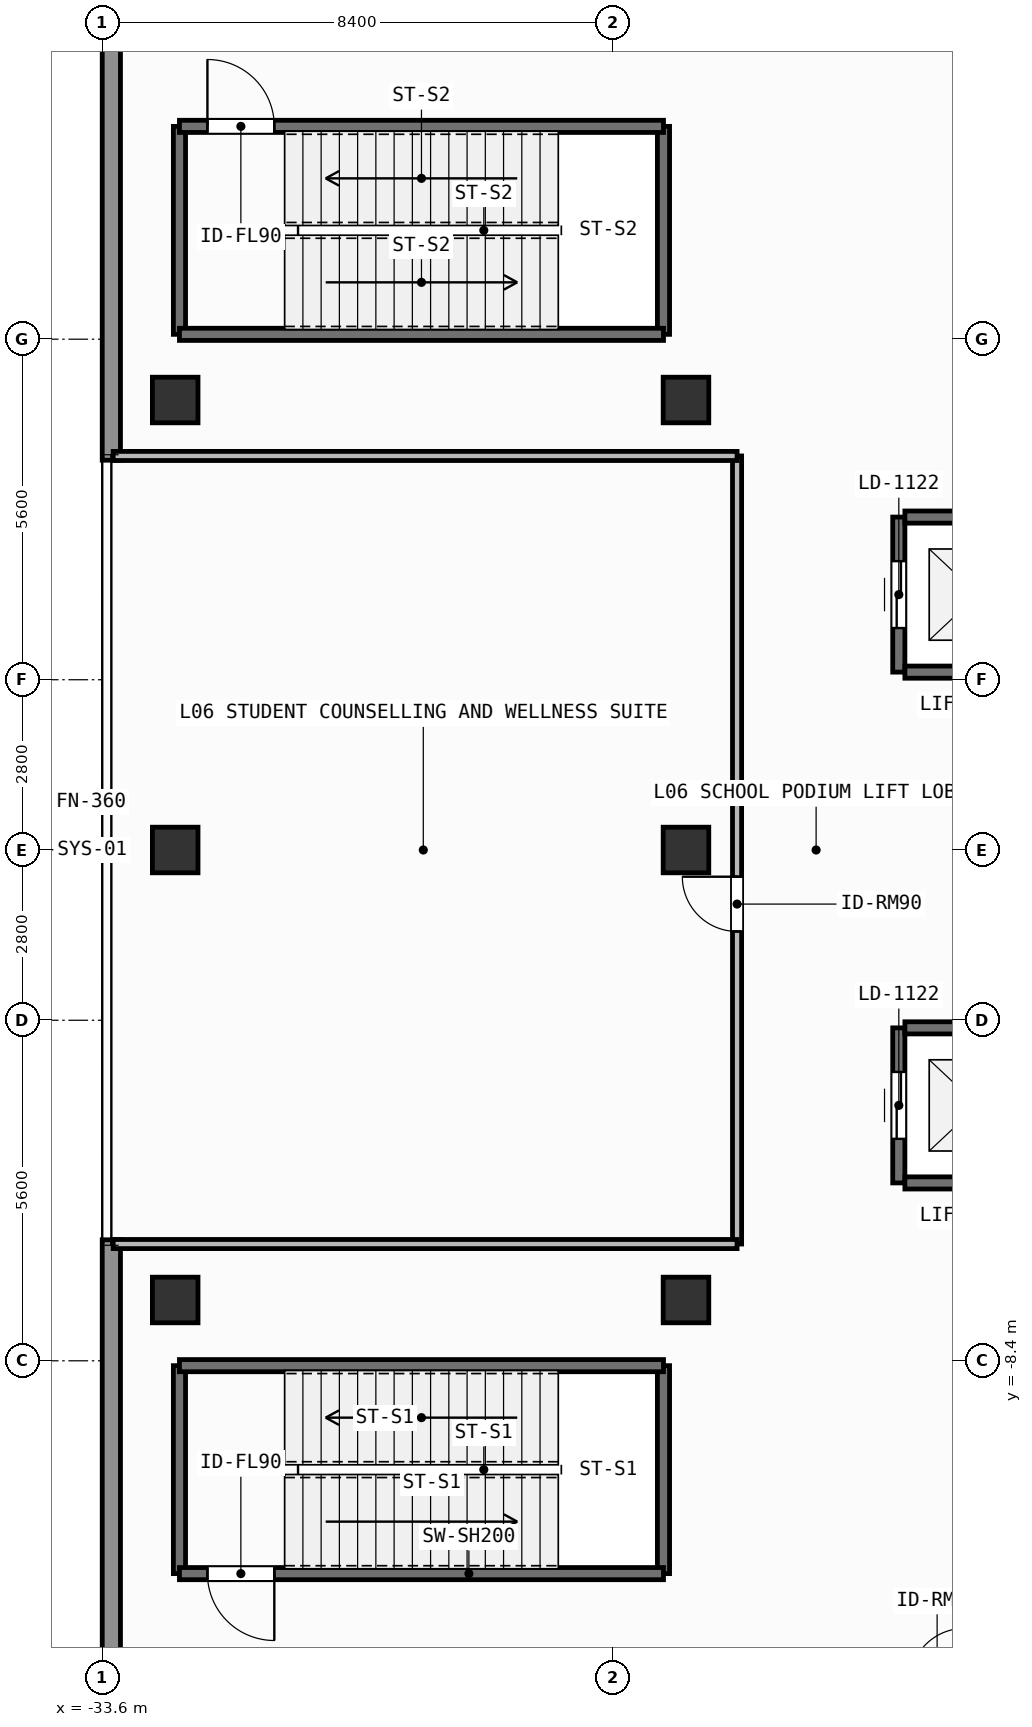
"""IFC4 building model, lengths in metres.
Left out: names, types, materials, properties, quantities, classifications, styles, units other than length and angle.
Written with IfcOpenShell. Run it as: python <this file> out.ifc"""

import sys

from ifc_helpers import new_model, si_unit, direction, frame, frame_2d, origin, origin_2d, place, context, subcontext, project, spatial, rectangle, extrude, element, fill, save


model = new_model("IFC4")
c1 = context("Model", 3, precision=1e-05, world=origin(), true_north=direction((0.0, 1.0)))
c2 = subcontext(c1, "Body", "Model", "MODEL_VIEW")
j1 = project(units=[si_unit("LENGTHUNIT", "METRE"), si_unit("PLANEANGLEUNIT", "RADIAN")], contexts=[c1])
p1 = place(None, origin())
s1 = spatial("IfcSite", under=j1, at=p1, CompositionType="ELEMENT")
p2 = place(p1, origin())
s2 = spatial("IfcBuilding", under=s1, at=p2, CompositionType="ELEMENT")
p3 = place(p2, frame((0.0, 0.0, 21.6)))
s3 = spatial("IfcBuildingStorey", under=s2, at=p3, CompositionType="ELEMENT", Elevation=21.6)
for number, where, z_axis, x_axis in (
    (1, (-32.4, -7.4, 0.0), (0.0, 0.0, 1.0), (1.0, 0.0, 0.0)),
    (2, (-32.4, 0.0, 0.0), (0.0, 0.0, 1.0), (1.0, 0.0, 0.0)),
    (3, (-32.4, 7.4, 0.0), (0.0, 0.0, 1.0), (1.0, 0.0, 0.0)),
    (4, (-24.0, -7.4, 0.0), (0.0, 0.0, 1.0), (1.0, 0.0, 0.0)),
    (5, (-24.0, 0.0, 0.0), (0.0, 0.0, 1.0), (1.0, 0.0, 0.0)),
    (6, (-24.0, 7.4, 0.0), (0.0, 0.0, 1.0), (1.0, 0.0, 0.0)),
):
    element("IfcColumn", number, at=place(p3, frame(where, z_axis=z_axis, x_axis=x_axis)), inside=s3, PredefinedType="COLUMN", context=c2, shape_type="SweptSolid", body=[
        extrude(rectangle(XDim=0.75, YDim=0.75, at=origin_2d()), origin(), (0.0, 0.0, 1.0), 4.8),
    ])
for number, where, z_axis, x_axis in (
    (7, (-33.45, -20.5, 0.0), (0.0, 0.0, 1.0), (0.0, 1.0, 0.0)),
    (8, (-33.45, 6.41, 0.0), (0.0, 0.0, 1.0), (0.0, 1.0, 0.0)),
):
    element("IfcWall", number, at=place(p3, frame(where, z_axis=z_axis, x_axis=x_axis)), inside=s3, PredefinedType="SOLIDWALL", context=c2, shape_type="SweptSolid", body=[
        extrude(rectangle(XDim=14.09, YDim=0.3, at=frame_2d((7.045, 0.0))), origin(), (0.0, 0.0, 1.0), 4.48),
    ])
p4 = place(p3, frame((-20.5, -5.475, 0.0), z_axis=(0.0, 0.0, 1.0), x_axis=(0.0, 1.0, 0.0)))
e9 = element("IfcWall", 9, at=p4, inside=s3, PredefinedType="SHEAR", context=c2, shape_type="SweptSolid", body=[
    extrude(rectangle(XDim=2.55, YDim=0.2, at=frame_2d((1.275, 0.0))), origin(), (0.0, 0.0, 1.0), 4.48),
])
p5 = place(p4, frame((0.725, 0.0, 0.0)))
e10 = element("IfcOpeningElement", 10, at=p5, cuts=e9, PredefinedType="OPENING", context=c2, shape_type="SweptSolid", body=[
    extrude(rectangle(XDim=1.1, YDim=2.2, at=frame_2d((0.55, 1.1))), frame((0.0, 0.11, 0.0), z_axis=(0.0, -1.0, 0.0), x_axis=(1.0, 0.0, 0.0)), (0.0, 0.0, 1.0), 0.22),
])
for number, where, z_axis, x_axis in (
    (11, (-20.4, -5.475, 0.0), (0.0, 0.0, 1.0), (1.0, 0.0, 0.0)),
    (12, (-20.4, -2.925, 0.0), (0.0, 0.0, 1.0), (1.0, 0.0, 0.0)),
):
    element("IfcWall", number, at=place(p3, frame(where, z_axis=z_axis, x_axis=x_axis)), inside=s3, PredefinedType="SHEAR", context=c2, shape_type="SweptSolid", body=[
        extrude(rectangle(XDim=2.4, YDim=0.2, at=frame_2d((1.2, 0.0))), origin(), (0.0, 0.0, 1.0), 4.48),
    ])
p6 = place(p3, frame((-20.5, 2.925, 0.0), z_axis=(0.0, 0.0, 1.0), x_axis=(0.0, 1.0, 0.0)))
e13 = element("IfcWall", 13, at=p6, inside=s3, PredefinedType="SHEAR", context=c2, shape_type="SweptSolid", body=[
    extrude(rectangle(XDim=2.55, YDim=0.2, at=frame_2d((1.275, 0.0))), origin(), (0.0, 0.0, 1.0), 4.48),
])
p7 = place(p6, frame((0.725, 0.0, 0.0)))
e14 = element("IfcOpeningElement", 14, at=p7, cuts=e13, PredefinedType="OPENING", context=c2, shape_type="SweptSolid", body=[
    extrude(rectangle(XDim=1.1, YDim=2.2, at=frame_2d((0.55, 1.1))), frame((0.0, 0.11, 0.0), z_axis=(0.0, -1.0, 0.0), x_axis=(1.0, 0.0, 0.0)), (0.0, 0.0, 1.0), 0.22),
])
for number, where, z_axis, x_axis in (
    (15, (-20.4, 2.925, 0.0), (0.0, 0.0, 1.0), (1.0, 0.0, 0.0)),
    (16, (-20.4, 5.475, 0.0), (0.0, 0.0, 1.0), (1.0, 0.0, 0.0)),
):
    element("IfcWall", number, at=place(p3, frame(where, z_axis=z_axis, x_axis=x_axis)), inside=s3, PredefinedType="SHEAR", context=c2, shape_type="SweptSolid", body=[
        extrude(rectangle(XDim=2.4, YDim=0.2, at=frame_2d((1.2, 0.0))), origin(), (0.0, 0.0, 1.0), 4.48),
    ])
for number, where, z_axis, x_axis in (
    (17, (-32.33, -11.9, 0.0), (0.0, 0.0, 1.0), (0.0, 1.0, 0.0)),
    (18, (-24.37, -8.48, 0.0), (0.0, 0.0, 1.0), (0.0, -1.0, 0.0)),
):
    element("IfcWall", number, at=place(p3, frame(where, z_axis=z_axis, x_axis=x_axis)), inside=s3, PredefinedType="SHEAR", context=c2, shape_type="SweptSolid", body=[
        extrude(rectangle(XDim=3.42, YDim=0.2, at=frame_2d((1.71, 0.0))), origin(), (0.0, 0.0, 1.0), 4.48),
    ])
p8 = place(p3, frame((-24.37, -11.9, 0.0), z_axis=(0.0, 0.0, 1.0), x_axis=(-1.0, 0.0, 0.0)))
e19 = element("IfcWall", 19, at=p8, inside=s3, PredefinedType="SHEAR", context=c2, shape_type="SweptSolid", body=[
    extrude(rectangle(XDim=7.96, YDim=0.2, at=frame_2d((3.98, 0.0))), origin(), (0.0, 0.0, 1.0), 4.48),
])
p9 = place(p8, frame((6.4, 0.0, 0.0)))
e20 = element("IfcOpeningElement", 20, at=p9, cuts=e19, PredefinedType="OPENING", context=c2, shape_type="SweptSolid", body=[
    extrude(rectangle(XDim=1.1, YDim=2.15, at=frame_2d((0.55, 1.075))), frame((0.0, 0.11, 0.0), z_axis=(0.0, -1.0, 0.0), x_axis=(1.0, 0.0, 0.0)), (0.0, 0.0, 1.0), 0.22),
])
p10 = place(p3, frame((-32.33, -8.48, 0.0), z_axis=(0.0, 0.0, 1.0), x_axis=(1.0, 0.0, 0.0)))
e21 = element("IfcWall", 21, at=p10, inside=s3, PredefinedType="SHEAR", context=c2, shape_type="SweptSolid", body=[
    extrude(rectangle(XDim=7.96, YDim=0.2, at=frame_2d((3.98, 0.0))), origin(), (0.0, 0.0, 1.0), 4.48),
])
for number, where, z_axis, x_axis in (
    (22, (-32.33, 8.48, 0.0), (0.0, 0.0, 1.0), (0.0, 1.0, 0.0)),
    (23, (-24.37, 11.9, 0.0), (0.0, 0.0, 1.0), (0.0, -1.0, 0.0)),
):
    element("IfcWall", number, at=place(p3, frame(where, z_axis=z_axis, x_axis=x_axis)), inside=s3, PredefinedType="SHEAR", context=c2, shape_type="SweptSolid", body=[
        extrude(rectangle(XDim=3.42, YDim=0.2, at=frame_2d((1.71, 0.0))), origin(), (0.0, 0.0, 1.0), 4.48),
    ])
p11 = place(p3, frame((-24.37, 8.48, 0.0), z_axis=(0.0, 0.0, 1.0), x_axis=(-1.0, 0.0, 0.0)))
e24 = element("IfcWall", 24, at=p11, inside=s3, PredefinedType="SHEAR", context=c2, shape_type="SweptSolid", body=[
    extrude(rectangle(XDim=7.96, YDim=0.2, at=frame_2d((3.98, 0.0))), origin(), (0.0, 0.0, 1.0), 4.48),
])
p12 = place(p3, frame((-32.33, 11.9, 0.0), z_axis=(0.0, 0.0, 1.0), x_axis=(1.0, 0.0, 0.0)))
e25 = element("IfcWall", 25, at=p12, inside=s3, PredefinedType="SHEAR", context=c2, shape_type="SweptSolid", body=[
    extrude(rectangle(XDim=7.96, YDim=0.2, at=frame_2d((3.98, 0.0))), origin(), (0.0, 0.0, 1.0), 4.48),
])
p13 = place(p12, frame((0.46, 0.0, 0.0)))
e26 = element("IfcOpeningElement", 26, at=p13, cuts=e25, PredefinedType="OPENING", context=c2, shape_type="SweptSolid", body=[
    extrude(rectangle(XDim=1.1, YDim=2.15, at=frame_2d((0.55, 1.075))), frame((0.0, 0.11, 0.0), z_axis=(0.0, -1.0, 0.0), x_axis=(1.0, 0.0, 0.0)), (0.0, 0.0, 1.0), 0.22),
])
p14 = place(p3, frame((-23.16, -6.48, 0.0), z_axis=(0.0, 0.0, 1.0), x_axis=(0.0, 1.0, 0.0)))
e27 = element("IfcWall", 27, at=p14, inside=s3, PredefinedType="PARTITIONING", context=c2, shape_type="SweptSolid", body=[
    extrude(rectangle(XDim=12.96, YDim=0.15, at=frame_2d((6.48, 0.0))), origin(), (0.0, 0.0, 1.0), 4.48),
])
p15 = place(p14, frame((5.141, 0.0, 0.0)))
e28 = element("IfcOpeningElement", 28, at=p15, cuts=e27, PredefinedType="OPENING", context=c2, shape_type="SweptSolid", body=[
    extrude(rectangle(XDim=0.9, YDim=2.1, at=frame_2d((0.45, 1.05))), frame((0.0, 0.085, 0.0), z_axis=(0.0, -1.0, 0.0), x_axis=(1.0, 0.0, 0.0)), (0.0, 0.0, 1.0), 0.17),
])
for number, where, z_axis, x_axis in (
    (29, (-33.42, -6.48, 0.0), (0.0, 0.0, 1.0), (1.0, 0.0, 0.0)),
    (30, (-33.42, 6.48, 0.0), (0.0, 0.0, 1.0), (1.0, 0.0, 0.0)),
):
    element("IfcWall", number, at=place(p3, frame(where, z_axis=z_axis, x_axis=x_axis)), inside=s3, PredefinedType="PARTITIONING", context=c2, shape_type="SweptSolid", body=[
        extrude(rectangle(XDim=10.26, YDim=0.15, at=frame_2d((5.13, 0.0))), origin(), (0.0, 0.0, 1.0), 4.48),
    ])
p16 = place(p5, origin())
e31 = element("IfcDoor", 31, at=p16, inside=s3, OperationType="SLIDING_TO_LEFT", PredefinedType="DOOR", context=c2, shape_type="SweptSolid", body=[
    extrude(rectangle(XDim=1.1, YDim=2.2, at=frame_2d((0.55, 1.1))), frame((0.0, 0.025, 0.0), z_axis=(0.0, -1.0, 0.0), x_axis=(1.0, 0.0, 0.0)), (0.0, 0.0, 1.0), 0.05),
])
fill(e10, e31)
p17 = place(p7, origin())
e32 = element("IfcDoor", 32, at=p17, inside=s3, OperationType="SLIDING_TO_LEFT", PredefinedType="DOOR", context=c2, shape_type="SweptSolid", body=[
    extrude(rectangle(XDim=1.1, YDim=2.2, at=frame_2d((0.55, 1.1))), frame((0.0, 0.025, 0.0), z_axis=(0.0, -1.0, 0.0), x_axis=(1.0, 0.0, 0.0)), (0.0, 0.0, 1.0), 0.05),
])
fill(e14, e32)
p18 = place(p9, origin())
e33 = element("IfcDoor", 33, at=p18, inside=s3, OperationType="SINGLE_SWING_LEFT", PredefinedType="DOOR", context=c2, shape_type="SweptSolid", body=[
    extrude(rectangle(XDim=1.1, YDim=2.15, at=frame_2d((0.55, 1.075))), frame((0.0, 0.025, 0.0), z_axis=(0.0, -1.0, 0.0), x_axis=(1.0, 0.0, 0.0)), (0.0, 0.0, 1.0), 0.05),
])
fill(e20, e33)
p19 = place(p13, origin())
e34 = element("IfcDoor", 34, at=p19, inside=s3, OperationType="SINGLE_SWING_LEFT", PredefinedType="DOOR", context=c2, shape_type="SweptSolid", body=[
    extrude(rectangle(XDim=1.1, YDim=2.15, at=frame_2d((0.55, 1.075))), frame((0.0, 0.025, 0.0), z_axis=(0.0, -1.0, 0.0), x_axis=(1.0, 0.0, 0.0)), (0.0, 0.0, 1.0), 0.05),
])
fill(e26, e34)
p20 = place(p15, origin())
e35 = element("IfcDoor", 35, at=p20, inside=s3, OperationType="SINGLE_SWING_RIGHT", PredefinedType="DOOR", context=c2, shape_type="SweptSolid", body=[
    extrude(rectangle(XDim=0.9, YDim=2.1, at=frame_2d((0.45, 1.05))), frame((0.0, 0.025, 0.0), z_axis=(0.0, -1.0, 0.0), x_axis=(1.0, 0.0, 0.0)), (0.0, 0.0, 1.0), 0.05),
])
fill(e28, e35)
save(model, sys.argv[1])
